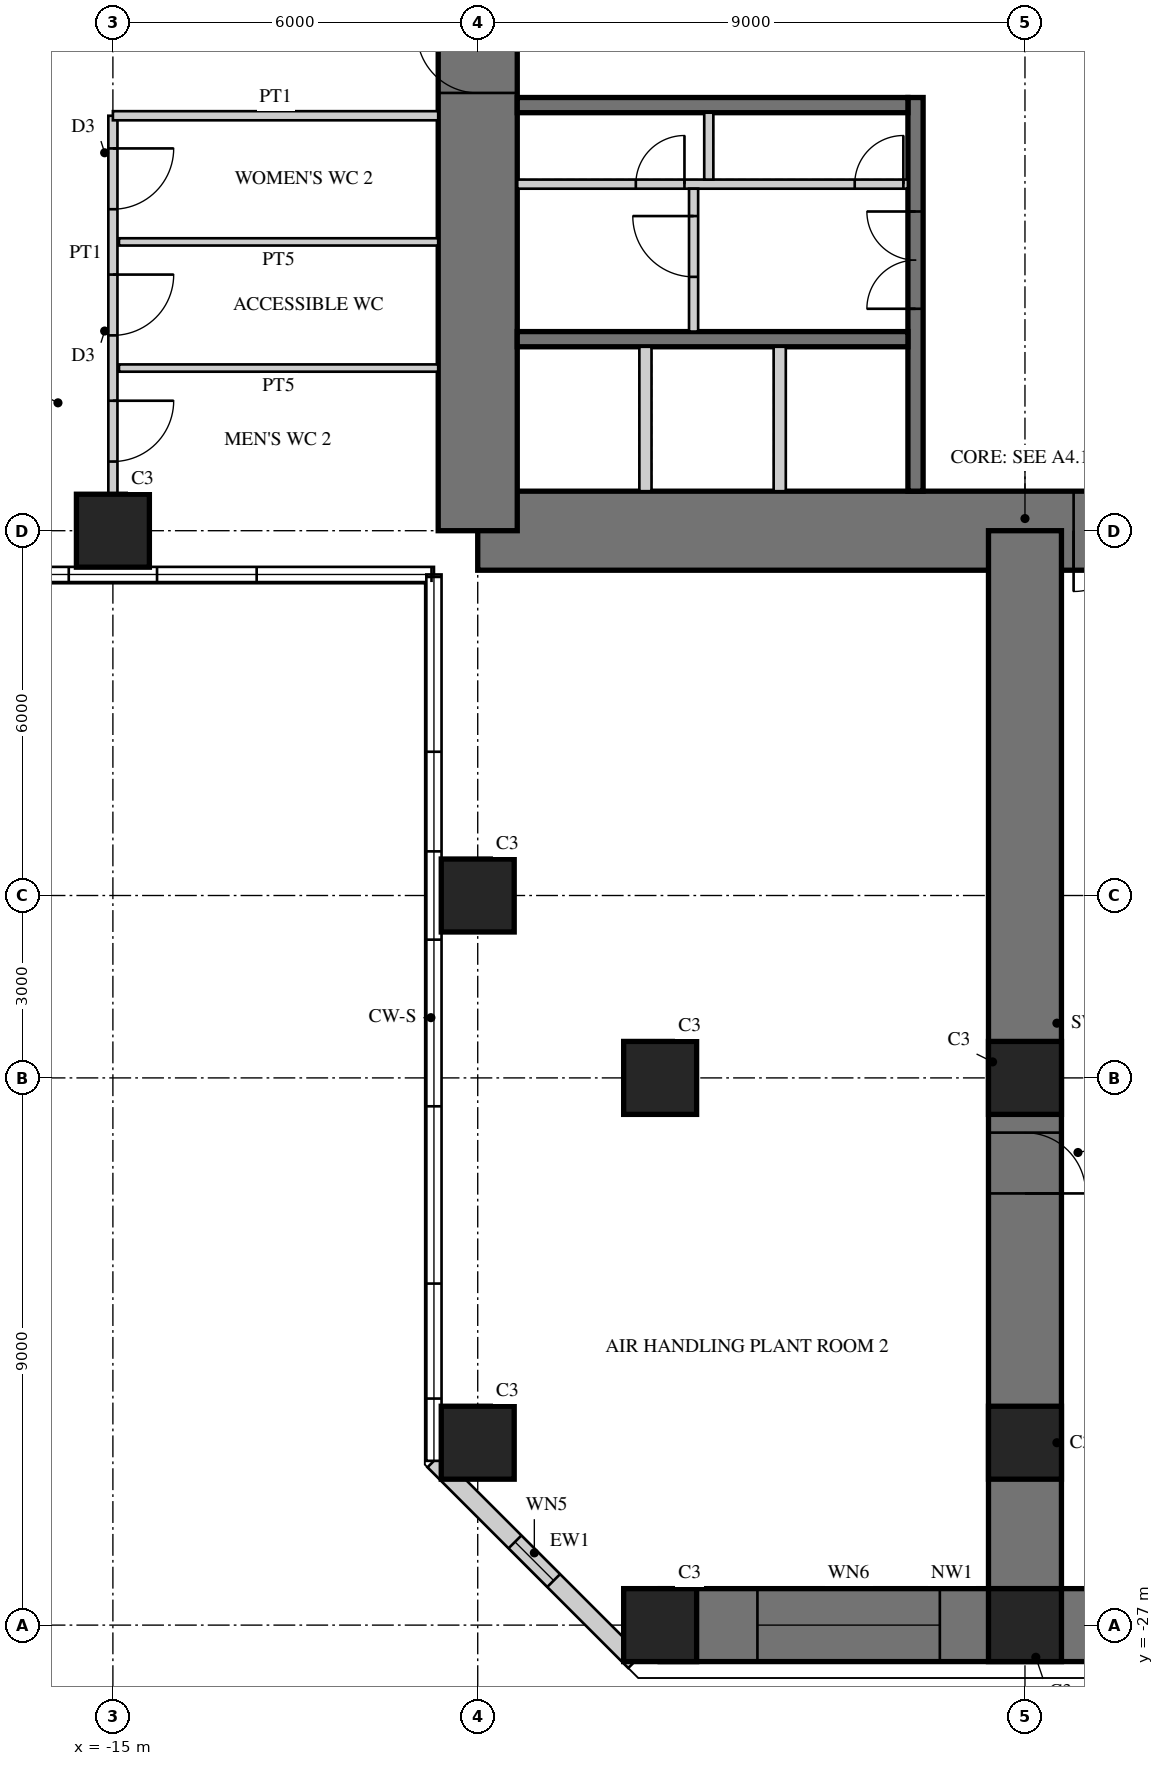
"""IFC4 building model, lengths in metres.
Left out: names, types, materials, properties, quantities, classifications, styles, units other than length and angle.
Written with IfcOpenShell. Run it as: python <this file> out.ifc"""

import sys

from ifc_helpers import new_model, si_unit, direction, frame, frame_2d, origin, origin_2d, place, context, subcontext, project, spatial, rectangle, hollow_rectangle, extrude, element, fill, save


model = new_model("IFC4")
c1 = context("Model", 3, precision=1e-05, world=origin(), true_north=direction((0.0, 1.0)))
c2 = subcontext(c1, "Body", "Model", "MODEL_VIEW")
j1 = project(units=[si_unit("LENGTHUNIT", "METRE"), si_unit("PLANEANGLEUNIT", "RADIAN")], contexts=[c1])
p1 = place(None, origin())
s1 = spatial("IfcSite", under=j1, at=p1, CompositionType="ELEMENT")
p2 = place(p1, origin())
s2 = spatial("IfcBuilding", under=s1, at=p2, CompositionType="ELEMENT")
p3 = place(p2, frame((0.0, 0.0, 95.5)))
s3 = spatial("IfcBuildingStorey", under=s2, at=p3, CompositionType="ELEMENT", Elevation=95.5)
p4 = place(p3, frame((-9.0, -9.0, 0.0), z_axis=(0.0, 0.0, 1.0), x_axis=(1.0, 0.0, 0.0)))
e1 = element("IfcWall", 1, at=p4, inside=s3, PredefinedType="SHEAR", context=c2, shape_type="SweptSolid", body=[
    extrude(rectangle(XDim=18.0, YDim=1.3, at=frame_2d((9.0, 0.0))), origin(), (0.0, 0.0, 1.0), 5.0),
])
p5 = place(p4, frame((9.8, 0.0, 0.0)))
e2 = element("IfcOpeningElement", 2, at=p5, cuts=e1, PredefinedType="OPENING", context=c2, shape_type="SweptSolid", body=[
    extrude(rectangle(XDim=1.0, YDim=2.4, at=frame_2d((0.5, 1.2))), frame((0.0, 0.66, 0.0), z_axis=(0.0, -1.0, 0.0), x_axis=(1.0, 0.0, 0.0)), (0.0, 0.0, 1.0), 1.32),
])
p6 = place(p3, frame((-9.0, 9.0, 0.0), z_axis=(0.0, 0.0, 1.0), x_axis=(0.0, -1.0, 0.0)))
e3 = element("IfcWall", 3, at=p6, inside=s3, PredefinedType="SHEAR", context=c2, shape_type="SweptSolid", body=[
    extrude(rectangle(XDim=18.0, YDim=1.3, at=frame_2d((9.0, 0.0))), origin(), (0.0, 0.0, 1.0), 5.0),
])
p7 = place(p6, frame((9.8, 0.0, 0.0)))
e4 = element("IfcOpeningElement", 4, at=p7, cuts=e3, PredefinedType="OPENING", context=c2, shape_type="SweptSolid", body=[
    extrude(rectangle(XDim=1.0, YDim=2.4, at=frame_2d((0.5, 1.2))), frame((0.0, 0.66, 0.0), z_axis=(0.0, -1.0, 0.0), x_axis=(1.0, 0.0, 0.0)), (0.0, 0.0, 1.0), 1.32),
])
p8 = place(p3, frame((-1.8, -1.875, 0.0), z_axis=(0.0, 0.0, 1.0), x_axis=(0.0, -1.0, 0.0)))
e5 = element("IfcWall", 5, at=p8, inside=s3, PredefinedType="SHEAR", context=c2, shape_type="SweptSolid", body=[
    extrude(rectangle(XDim=6.475, YDim=0.25, at=frame_2d((3.238, 0.0))), origin(), (0.0, 0.0, 1.0), 5.0),
])
p9 = place(p8, frame((1.875, 0.0, 0.0)))
e6 = element("IfcOpeningElement", 6, at=p9, cuts=e5, PredefinedType="OPENING", context=c2, shape_type="SweptSolid", body=[
    extrude(rectangle(XDim=1.6, YDim=2.4, at=frame_2d((0.8, 1.2))), frame((0.0, 0.135, 0.0), z_axis=(0.0, -1.0, 0.0), x_axis=(1.0, 0.0, 0.0)), (0.0, 0.0, 1.0), 0.27),
])
for number, where, z_axis, x_axis in (
    (7, (-1.925, -2.0, 0.0), (0.0, 0.0, 1.0), (-1.0, 0.0, 0.0)),
    (8, (-1.925, -5.85, 0.0), (0.0, 0.0, 1.0), (-1.0, 0.0, 0.0)),
):
    element("IfcWall", number, at=place(p3, frame(where, z_axis=z_axis, x_axis=x_axis)), inside=s3, PredefinedType="SHEAR", context=c2, shape_type="SweptSolid", body=[
        extrude(rectangle(XDim=6.425, YDim=0.25, at=frame_2d((3.212, 0.0))), origin(), (0.0, 0.0, 1.0), 5.0),
    ])
p10 = place(p3, frame((-1.925, -3.3, 0.0), z_axis=(0.0, 0.0, 1.0), x_axis=(-1.0, 0.0, 0.0)))
e9 = element("IfcWall", 9, at=p10, inside=s3, PredefinedType="PARTITIONING", context=c2, shape_type="SweptSolid", body=[
    extrude(rectangle(XDim=6.425, YDim=0.15, at=frame_2d((3.212, 0.0))), origin(), (0.0, 0.0, 1.0), 5.0),
])
p11 = place(p10, frame((0.075, 0.0, 0.0)))
e10 = element("IfcOpeningElement", 10, at=p11, cuts=e9, PredefinedType="OPENING", context=c2, shape_type="SweptSolid", body=[
    extrude(rectangle(XDim=0.8, YDim=2.1, at=frame_2d((0.4, 1.05))), frame((0.0, 0.085, 0.0), z_axis=(0.0, -1.0, 0.0), x_axis=(1.0, 0.0, 0.0)), (0.0, 0.0, 1.0), 0.17),
])
p12 = place(p10, frame((3.675, 0.0, 0.0)))
e11 = element("IfcOpeningElement", 11, at=p12, cuts=e9, PredefinedType="OPENING", context=c2, shape_type="SweptSolid", body=[
    extrude(rectangle(XDim=0.8, YDim=2.1, at=frame_2d((0.4, 1.05))), frame((0.0, 0.085, 0.0), z_axis=(0.0, -1.0, 0.0), x_axis=(1.0, 0.0, 0.0)), (0.0, 0.0, 1.0), 0.17),
])
p13 = place(p3, frame((-5.2, -2.125, 0.0), z_axis=(0.0, 0.0, 1.0), x_axis=(0.0, -1.0, 0.0)))
e12 = element("IfcWall", 12, at=p13, inside=s3, PredefinedType="PARTITIONING", context=c2, shape_type="SweptSolid", body=[
    extrude(rectangle(XDim=1.1, YDim=0.15, at=frame_2d((0.55, 0.0))), origin(), (0.0, 0.0, 1.0), 5.0),
])
for number, where, z_axis, x_axis in (
    (13, (-4.033, -5.975, 0.0), (0.0, 0.0, 1.0), (0.0, -1.0, 0.0)),
    (14, (-6.242, -5.975, 0.0), (0.0, 0.0, 1.0), (0.0, -1.0, 0.0)),
):
    element("IfcWall", number, at=place(p3, frame(where, z_axis=z_axis, x_axis=x_axis)), inside=s3, PredefinedType="PARTITIONING", context=c2, shape_type="SweptSolid", body=[
        extrude(rectangle(XDim=2.375, YDim=0.2, at=frame_2d((1.188, 0.0))), origin(), (0.0, 0.0, 1.0), 5.0),
    ])
p14 = place(p3, frame((0.0, -9.0, 0.0), z_axis=(0.0, 0.0, 1.0), x_axis=(0.0, -1.0, 0.0)))
e15 = element("IfcWall", 15, at=p14, inside=s3, PredefinedType="SHEAR", context=c2, shape_type="SweptSolid", body=[
    extrude(rectangle(XDim=18.0, YDim=1.2, at=frame_2d((9.0, 0.0))), origin(), (0.0, 0.0, 1.0), 5.0),
])
p15 = place(p14, frame((9.9, 0.0, 0.0)))
e16 = element("IfcOpeningElement", 16, at=p15, cuts=e15, PredefinedType="OPENING", context=c2, shape_type="SweptSolid", body=[
    extrude(rectangle(XDim=1.0, YDim=2.2, at=frame_2d((0.5, 1.1))), frame((0.0, 0.61, 0.0), z_axis=(0.0, -1.0, 0.0), x_axis=(1.0, 0.0, 0.0)), (0.0, 0.0, 1.0), 1.22),
])
p16 = place(p3, frame((-6.0, -27.0, 0.0), z_axis=(0.0, 0.0, 1.0), x_axis=(1.0, 0.0, 0.0)))
e17 = element("IfcWall", 17, at=p16, inside=s3, PredefinedType="SHEAR", context=c2, shape_type="SweptSolid", body=[
    extrude(rectangle(XDim=12.0, YDim=1.2, at=frame_2d((6.0, 0.0))), origin(), (0.0, 0.0, 1.0), 5.0),
])
p17 = place(p16, frame((1.6, 0.0, 0.6)))
e18 = element("IfcOpeningElement", 18, at=p17, cuts=e17, PredefinedType="OPENING", context=c2, shape_type="SweptSolid", body=[
    extrude(rectangle(XDim=3.0, YDim=2.4, at=frame_2d((1.5, 1.2))), frame((0.0, 0.61, 0.0), z_axis=(0.0, -1.0, 0.0), x_axis=(1.0, 0.0, 0.0)), (0.0, 0.0, 1.0), 1.22),
])
p18 = place(p16, frame((7.4, 0.0, 0.6)))
e19 = element("IfcOpeningElement", 19, at=p18, cuts=e17, PredefinedType="OPENING", context=c2, shape_type="SweptSolid", body=[
    extrude(rectangle(XDim=3.0, YDim=2.4, at=frame_2d((1.5, 1.2))), frame((0.0, 0.61, 0.0), z_axis=(0.0, -1.0, 0.0), x_axis=(1.0, 0.0, 0.0)), (0.0, 0.0, 1.0), 1.22),
])
for number, where, z_axis, x_axis in (
    (20, (-9.0, -15.0, 0.0), (0.0, 0.0, 1.0), (1.0, 0.0, 0.0)),
    (21, (-9.0, -24.0, 0.0), (0.0, 0.0, 1.0), (1.0, 0.0, 0.0)),
    (22, (-6.0, -27.0, 0.0), (0.0, 0.0, 1.0), (1.0, 0.0, 0.0)),
    (23, (0.0, -27.0, 0.0), (0.0, 0.0, 1.0), (1.0, 0.0, 0.0)),
    (24, (-15.0, -9.0, 0.0), (0.0, 0.0, 1.0), (1.0, 0.0, 0.0)),
    (25, (-6.0, -18.0, 0.0), (0.0, 0.0, 1.0), (1.0, 0.0, 0.0)),
    (26, (0.0, -18.0, 0.0), (0.0, 0.0, 1.0), (1.0, 0.0, 0.0)),
    (27, (0.0, -24.0, 0.0), (0.0, 0.0, 1.0), (1.0, 0.0, 0.0)),
):
    element("IfcColumn", number, at=place(p3, frame(where, z_axis=z_axis, x_axis=x_axis)), inside=s3, PredefinedType="COLUMN", context=c2, shape_type="SweptSolid", body=[
        extrude(rectangle(XDim=1.2, YDim=1.2, at=origin_2d()), origin(), (0.0, 0.0, 1.0), 5.0),
    ])
p19 = place(p3, frame((-9.72, -24.298, 0.0), z_axis=(0.0, 0.0, 1.0), x_axis=(0.707106781187, -0.707106781187, 0.0)))
e28 = element("IfcWall", 28, at=p19, inside=s3, PredefinedType="SOLIDWALL", context=c2, shape_type="SweptSolid", body=[
    extrude(rectangle(XDim=4.669, YDim=0.3, at=frame_2d((2.335, 0.0))), origin(), (0.0, 0.0, 1.0), 4.8),
])
p20 = place(p19, frame((1.885, 0.0, 0.3)))
e29 = element("IfcOpeningElement", 29, at=p20, cuts=e28, PredefinedType="OPENING", context=c2, shape_type="SweptSolid", body=[
    extrude(rectangle(XDim=0.9, YDim=2.4, at=frame_2d((0.45, 1.2))), frame((0.0, 0.16, 0.0), z_axis=(0.0, -1.0, 0.0), x_axis=(1.0, 0.0, 0.0)), (0.0, 0.0, 1.0), 0.32),
])
p21 = place(p3, frame((-5.45, -3.375, 0.0), z_axis=(0.0, 0.0, 1.0), x_axis=(0.0, -1.0, 0.0)))
e30 = element("IfcWall", 30, at=p21, inside=s3, PredefinedType="PARTITIONING", context=c2, shape_type="SweptSolid", body=[
    extrude(rectangle(XDim=2.35, YDim=0.15, at=frame_2d((1.175, 0.0))), origin(), (0.0, 0.0, 1.0), 4.8),
])
p22 = place(p21, frame((0.45, 0.0, 0.0)))
e31 = element("IfcOpeningElement", 31, at=p22, cuts=e30, PredefinedType="OPENING", context=c2, shape_type="SweptSolid", body=[
    extrude(rectangle(XDim=1.0, YDim=2.1, at=frame_2d((0.5, 1.05))), frame((0.0, 0.085, 0.0), z_axis=(0.0, -1.0, 0.0), x_axis=(1.0, 0.0, 0.0)), (0.0, 0.0, 1.0), 0.17),
])
p23 = place(p3, frame((-15.0, -2.175, 0.0), z_axis=(0.0, 0.0, 1.0), x_axis=(0.0, -1.0, 0.0)))
e32 = element("IfcWall", 32, at=p23, inside=s3, PredefinedType="PARTITIONING", context=c2, shape_type="SweptSolid", body=[
    extrude(rectangle(XDim=6.225, YDim=0.15, at=frame_2d((3.112, 0.0))), origin(), (0.0, 0.0, 1.0), 3.95),
])
p24 = place(p23, frame((0.538, 0.0, 0.0)))
e33 = element("IfcOpeningElement", 33, at=p24, cuts=e32, PredefinedType="OPENING", context=c2, shape_type="SweptSolid", body=[
    extrude(rectangle(XDim=1.0, YDim=2.1, at=frame_2d((0.5, 1.05))), frame((0.0, 0.085, 0.0), z_axis=(0.0, -1.0, 0.0), x_axis=(1.0, 0.0, 0.0)), (0.0, 0.0, 1.0), 0.17),
])
p25 = place(p23, frame((2.613, 0.0, 0.0)))
e34 = element("IfcOpeningElement", 34, at=p25, cuts=e32, PredefinedType="OPENING", context=c2, shape_type="SweptSolid", body=[
    extrude(rectangle(XDim=1.0, YDim=2.1, at=frame_2d((0.5, 1.05))), frame((0.0, 0.085, 0.0), z_axis=(0.0, -1.0, 0.0), x_axis=(1.0, 0.0, 0.0)), (0.0, 0.0, 1.0), 0.17),
])
p26 = place(p23, frame((4.688, 0.0, 0.0)))
e35 = element("IfcOpeningElement", 35, at=p26, cuts=e32, PredefinedType="OPENING", context=c2, shape_type="SweptSolid", body=[
    extrude(rectangle(XDim=1.0, YDim=2.1, at=frame_2d((0.5, 1.05))), frame((0.0, 0.085, 0.0), z_axis=(0.0, -1.0, 0.0), x_axis=(1.0, 0.0, 0.0)), (0.0, 0.0, 1.0), 0.17),
])
p27 = place(p3, frame((-9.65, -2.175, 0.0), z_axis=(0.0, 0.0, 1.0), x_axis=(-1.0, 0.0, 0.0)))
e36 = element("IfcWall", 36, at=p27, inside=s3, PredefinedType="PARTITIONING", context=c2, shape_type="SweptSolid", body=[
    extrude(rectangle(XDim=5.35, YDim=0.15, at=frame_2d((2.675, 0.0))), origin(), (0.0, 0.0, 1.0), 4.8),
])
for number, where, z_axis, x_axis in (
    (37, (-9.65, -4.25, 0.0), (0.0, 0.0, 1.0), (-1.0, 0.0, 0.0)),
    (38, (-9.65, -6.325, 0.0), (0.0, 0.0, 1.0), (-1.0, 0.0, 0.0)),
):
    element("IfcWall", number, at=place(p3, frame(where, z_axis=z_axis, x_axis=x_axis)), inside=s3, PredefinedType="PLUMBINGWALL", context=c2, shape_type="SweptSolid", body=[
        extrude(rectangle(XDim=5.25, YDim=0.12, at=frame_2d((2.625, 0.0))), origin(), (0.0, 0.0, 1.0), 4.8),
    ])
p28 = place(p20, origin())
e39 = element("IfcWindow", 39, at=p28, inside=s3, PartitioningType="SINGLE_PANEL", PredefinedType="WINDOW", context=c2, shape_type="SweptSolid", body=[
    extrude(hollow_rectangle(XDim=0.9, YDim=2.4, WallThickness=0.06, at=frame_2d((0.45, 1.2))), frame((0.0, 0.03, 0.0), z_axis=(0.0, -1.0, 0.0), x_axis=(1.0, 0.0, 0.0)), (0.0, 0.0, 1.0), 0.06),
    extrude(rectangle(XDim=0.779, YDim=2.279, at=frame_2d((0.45, 1.2))), frame((0.0, 0.03, 0.0), z_axis=(0.0, -1.0, 0.0), x_axis=(1.0, 0.0, 0.0)), (0.0, 0.0, 1.0), 0.06),
])
fill(e29, e39)
p29 = place(p17, origin())
e40 = element("IfcWindow", 40, at=p29, inside=s3, PartitioningType="SINGLE_PANEL", PredefinedType="WINDOW", context=c2, shape_type="SweptSolid", body=[
    extrude(hollow_rectangle(XDim=3.0, YDim=2.4, WallThickness=0.06, at=frame_2d((1.5, 1.2))), frame((0.0, 0.03, 0.0), z_axis=(0.0, -1.0, 0.0), x_axis=(1.0, 0.0, 0.0)), (0.0, 0.0, 1.0), 0.06),
    extrude(rectangle(XDim=2.879, YDim=2.279, at=frame_2d((1.5, 1.2))), frame((0.0, 0.03, 0.0), z_axis=(0.0, -1.0, 0.0), x_axis=(1.0, 0.0, 0.0)), (0.0, 0.0, 1.0), 0.06),
])
fill(e18, e40)
p30 = place(p22, frame((1.0, 0.0, 0.0), z_axis=(0.0, 0.0, 1.0), x_axis=(-1.0, 0.0, 0.0)))
e41 = element("IfcDoor", 41, at=p30, inside=s3, OperationType="SINGLE_SWING_RIGHT", PredefinedType="DOOR", context=c2, shape_type="SweptSolid", body=[
    extrude(rectangle(XDim=1.0, YDim=2.1, at=frame_2d((0.5, 1.05))), frame((0.0, 0.025, 0.0), z_axis=(0.0, -1.0, 0.0), x_axis=(1.0, 0.0, 0.0)), (0.0, 0.0, 1.0), 0.05),
])
fill(e31, e41)
p31 = place(p24, origin())
e42 = element("IfcDoor", 42, at=p31, inside=s3, OperationType="SINGLE_SWING_LEFT", PredefinedType="DOOR", context=c2, shape_type="SweptSolid", body=[
    extrude(rectangle(XDim=1.0, YDim=2.1, at=frame_2d((0.5, 1.05))), frame((0.0, 0.025, 0.0), z_axis=(0.0, -1.0, 0.0), x_axis=(1.0, 0.0, 0.0)), (0.0, 0.0, 1.0), 0.05),
])
fill(e33, e42)
p32 = place(p25, origin())
e43 = element("IfcDoor", 43, at=p32, inside=s3, OperationType="SINGLE_SWING_LEFT", PredefinedType="DOOR", context=c2, shape_type="SweptSolid", body=[
    extrude(rectangle(XDim=1.0, YDim=2.1, at=frame_2d((0.5, 1.05))), frame((0.0, 0.025, 0.0), z_axis=(0.0, -1.0, 0.0), x_axis=(1.0, 0.0, 0.0)), (0.0, 0.0, 1.0), 0.05),
])
fill(e34, e43)
p33 = place(p26, origin())
e44 = element("IfcDoor", 44, at=p33, inside=s3, OperationType="SINGLE_SWING_LEFT", PredefinedType="DOOR", context=c2, shape_type="SweptSolid", body=[
    extrude(rectangle(XDim=1.0, YDim=2.1, at=frame_2d((0.5, 1.05))), frame((0.0, 0.025, 0.0), z_axis=(0.0, -1.0, 0.0), x_axis=(1.0, 0.0, 0.0)), (0.0, 0.0, 1.0), 0.05),
])
fill(e35, e44)
p34 = place(p15, origin())
e45 = element("IfcDoor", 45, at=p34, inside=s3, OperationType="SINGLE_SWING_RIGHT", PredefinedType="DOOR", context=c2, shape_type="SweptSolid", body=[
    extrude(rectangle(XDim=1.0, YDim=2.2, at=frame_2d((0.5, 1.1))), frame((0.0, 0.025, 0.0), z_axis=(0.0, -1.0, 0.0), x_axis=(1.0, 0.0, 0.0)), (0.0, 0.0, 1.0), 0.05),
])
fill(e16, e45)
p35 = place(p5, frame((1.0, 0.0, 0.0), z_axis=(0.0, 0.0, 1.0), x_axis=(-1.0, 0.0, 0.0)))
e46 = element("IfcDoor", 46, at=p35, inside=s3, OperationType="SINGLE_SWING_RIGHT", PredefinedType="DOOR", context=c2, shape_type="SweptSolid", body=[
    extrude(rectangle(XDim=1.0, YDim=2.4, at=frame_2d((0.5, 1.2))), frame((0.0, -0.005, 0.0), z_axis=(0.0, -1.0, 0.0), x_axis=(1.0, 0.0, 0.0)), (0.0, 0.0, 1.0), 0.05),
])
fill(e2, e46)
p36 = place(p7, frame((1.0, 0.0, 0.0), z_axis=(0.0, 0.0, 1.0), x_axis=(-1.0, 0.0, 0.0)))
e47 = element("IfcDoor", 47, at=p36, inside=s3, OperationType="SINGLE_SWING_RIGHT", PredefinedType="DOOR", context=c2, shape_type="SweptSolid", body=[
    extrude(rectangle(XDim=1.0, YDim=2.4, at=frame_2d((0.5, 1.2))), frame((0.0, -0.005, 0.0), z_axis=(0.0, -1.0, 0.0), x_axis=(1.0, 0.0, 0.0)), (0.0, 0.0, 1.0), 0.05),
])
fill(e4, e47)
p37 = place(p9, frame((1.6, 0.0, 0.0), z_axis=(0.0, 0.0, 1.0), x_axis=(-1.0, 0.0, 0.0)))
e48 = element("IfcDoor", 48, at=p37, inside=s3, OperationType="DOUBLE_DOOR_SINGLE_SWING", PredefinedType="DOOR", context=c2, shape_type="SweptSolid", body=[
    extrude(rectangle(XDim=1.6, YDim=2.4, at=frame_2d((0.8, 1.2))), frame((0.0, 0.025, 0.0), z_axis=(0.0, -1.0, 0.0), x_axis=(1.0, 0.0, 0.0)), (0.0, 0.0, 1.0), 0.05),
])
fill(e6, e48)
p38 = place(p11, frame((0.8, 0.0, 0.0), z_axis=(0.0, 0.0, 1.0), x_axis=(-1.0, 0.0, 0.0)))
e49 = element("IfcDoor", 49, at=p38, inside=s3, OperationType="SINGLE_SWING_RIGHT", PredefinedType="DOOR", context=c2, shape_type="SweptSolid", body=[
    extrude(rectangle(XDim=0.8, YDim=2.1, at=frame_2d((0.4, 1.05))), frame((0.0, 0.025, 0.0), z_axis=(0.0, -1.0, 0.0), x_axis=(1.0, 0.0, 0.0)), (0.0, 0.0, 1.0), 0.05),
])
fill(e10, e49)
p39 = place(p12, frame((0.8, 0.0, 0.0), z_axis=(0.0, 0.0, 1.0), x_axis=(-1.0, 0.0, 0.0)))
e50 = element("IfcDoor", 50, at=p39, inside=s3, OperationType="SINGLE_SWING_RIGHT", PredefinedType="DOOR", context=c2, shape_type="SweptSolid", body=[
    extrude(rectangle(XDim=0.8, YDim=2.1, at=frame_2d((0.4, 1.05))), frame((0.0, 0.025, 0.0), z_axis=(0.0, -1.0, 0.0), x_axis=(1.0, 0.0, 0.0)), (0.0, 0.0, 1.0), 0.05),
])
fill(e11, e50)
save(model, sys.argv[1])
